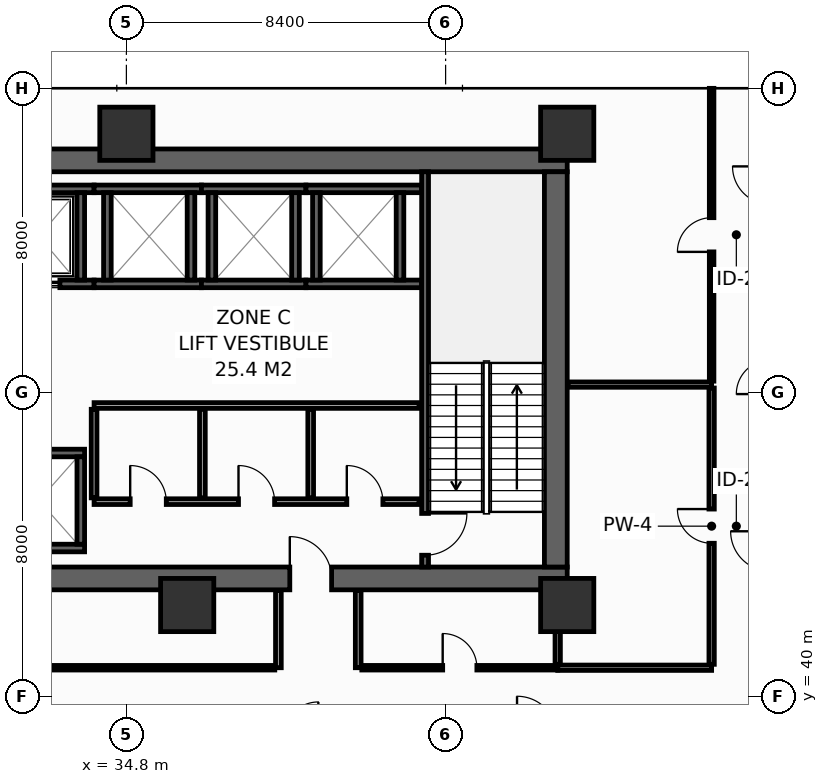
"""IFC4 building model, lengths in metres.
Left out: names, types, materials, properties, quantities, classifications, styles, units other than length and angle.
Written with IfcOpenShell. Run it as: python <this file> out.ifc"""

import sys

from ifc_helpers import new_model, si_unit, direction, frame, frame_2d, origin, origin_2d, place, context, subcontext, project, spatial, rectangle, hollow_rectangle, extrude, element, fill, save


model = new_model("IFC4")
c1 = context("Model", 3, precision=1e-05, world=origin(), true_north=direction((0.0, 1.0)))
c2 = subcontext(c1, "Body", "Model", "MODEL_VIEW")
j1 = project(units=[si_unit("LENGTHUNIT", "METRE"), si_unit("PLANEANGLEUNIT", "RADIAN")], contexts=[c1])
p1 = place(None, origin())
s1 = spatial("IfcSite", under=j1, at=p1, CompositionType="ELEMENT")
p2 = place(p1, origin())
s2 = spatial("IfcBuilding", under=s1, at=p2, CompositionType="ELEMENT")
p3 = place(p2, frame((0.0, 0.0, 33.0)))
s3 = spatial("IfcBuildingStorey", under=s2, at=p3, CompositionType="ELEMENT", Elevation=33.0)
p4 = place(p3, frame((13.5, 43.1, 0.0), z_axis=(0.0, 0.0, 1.0), x_axis=(1.0, 0.0, 0.0)))
e1 = element("IfcWall", 1, at=p4, inside=s3, PredefinedType="SHEAR", context=c2, shape_type="SweptSolid", body=[
    extrude(rectangle(XDim=32.9, YDim=0.6, at=frame_2d((16.45, 0.0))), origin(), (0.0, 0.0, 1.0), 4.95),
])
p5 = place(p4, frame((5.4, 0.0, 0.0)))
e2 = element("IfcOpeningElement", 2, at=p5, cuts=e1, PredefinedType="OPENING", context=c2, shape_type="SweptSolid", body=[
    extrude(rectangle(XDim=1.1, YDim=2.15, at=frame_2d((0.55, 1.075))), frame((0.0, 0.31, 0.0), z_axis=(0.0, -1.0, 0.0), x_axis=(1.0, 0.0, 0.0)), (0.0, 0.0, 1.0), 0.62),
])
p6 = place(p4, frame((25.6, 0.0, 0.0)))
e3 = element("IfcOpeningElement", 3, at=p6, cuts=e1, PredefinedType="OPENING", context=c2, shape_type="SweptSolid", body=[
    extrude(rectangle(XDim=1.1, YDim=2.15, at=frame_2d((0.55, 1.075))), frame((0.0, 0.31, 0.0), z_axis=(0.0, -1.0, 0.0), x_axis=(1.0, 0.0, 0.0)), (0.0, 0.0, 1.0), 0.62),
])
p7 = place(p3, frame((13.5, 54.1, 0.0), z_axis=(0.0, 0.0, 1.0), x_axis=(1.0, 0.0, 0.0)))
e4 = element("IfcWall", 4, at=p7, inside=s3, PredefinedType="SHEAR", context=c2, shape_type="SweptSolid", body=[
    extrude(rectangle(XDim=32.9, YDim=0.6, at=frame_2d((16.45, 0.0))), origin(), (0.0, 0.0, 1.0), 4.95),
])
p8 = place(p3, frame((46.1, 43.4, 0.0), z_axis=(0.0, 0.0, 1.0), x_axis=(0.0, 1.0, 0.0)))
e5 = element("IfcWall", 5, at=p8, inside=s3, PredefinedType="SHEAR", context=c2, shape_type="SweptSolid", body=[
    extrude(rectangle(XDim=10.4, YDim=0.6, at=frame_2d((5.2, 0.0))), origin(), (0.0, 0.0, 1.0), 4.95),
])
for number, where, z_axis, x_axis in (
    (6, (34.8, 54.8, 0.0), (0.0, 0.0, 1.0), (1.0, 0.0, 0.0)),
    (7, (46.4, 54.8, 0.0), (0.0, 0.0, 1.0), (1.0, 0.0, 0.0)),
    (8, (36.4, 42.4, 0.0), (0.0, 0.0, 1.0), (1.0, 0.0, 0.0)),
    (9, (46.4, 42.4, 0.0), (0.0, 0.0, 1.0), (1.0, 0.0, 0.0)),
):
    element("IfcColumn", number, at=place(p3, frame(where, z_axis=z_axis, x_axis=x_axis)), inside=s3, PredefinedType="COLUMN", context=c2, shape_type="SweptSolid", body=[
        extrude(hollow_rectangle(XDim=1.4, YDim=1.4, WallThickness=0.065, at=origin_2d()), origin(), (0.0, 0.0, 1.0), 5.4),
    ])
p9 = place(p3, frame((31.125, 50.85, 0.0), z_axis=(0.0, 0.0, 1.0), x_axis=(1.0, 0.0, 0.0)))
e10 = element("IfcWall", 10, at=p9, inside=s3, PredefinedType="SHEAR", context=c2, shape_type="SweptSolid", body=[
    extrude(rectangle(XDim=2.825, YDim=0.2, at=frame_2d((1.413, 0.0))), origin(), (0.0, 0.0, 1.0), 4.95),
])
p10 = place(p9, frame((0.825, 0.0, 0.0)))
e11 = element("IfcOpeningElement", 11, at=p10, cuts=e10, PredefinedType="OPENING", context=c2, shape_type="SweptSolid", body=[
    extrude(rectangle(XDim=1.1, YDim=2.2, at=frame_2d((0.55, 1.1))), frame((0.0, 0.11, 0.0), z_axis=(0.0, -1.0, 0.0), x_axis=(1.0, 0.0, 0.0)), (0.0, 0.0, 1.0), 0.22),
])
p11 = place(p3, frame((31.125, 53.35, 0.0), z_axis=(0.0, 0.0, 1.0), x_axis=(1.0, 0.0, 0.0)))
e12 = element("IfcWall", 12, at=p11, inside=s3, PredefinedType="SHEAR", context=c2, shape_type="SweptSolid", body=[
    extrude(rectangle(XDim=2.825, YDim=0.2, at=frame_2d((1.413, 0.0))), origin(), (0.0, 0.0, 1.0), 4.95),
])
p12 = place(p3, frame((33.6, 50.95, 0.0), z_axis=(0.0, 0.0, 1.0), x_axis=(0.0, 1.0, 0.0)))
e13 = element("IfcWall", 13, at=p12, inside=s3, PredefinedType="SHEAR", context=c2, shape_type="SweptSolid", body=[
    extrude(rectangle(XDim=2.3, YDim=0.2, at=frame_2d((1.15, 0.0))), origin(), (0.0, 0.0, 1.0), 4.95),
])
for number, where, z_axis, x_axis in (
    (14, (31.125, 43.9, 0.0), (0.0, 0.0, 1.0), (1.0, 0.0, 0.0)),
    (15, (31.125, 46.4, 0.0), (0.0, 0.0, 1.0), (1.0, 0.0, 0.0)),
):
    element("IfcWall", number, at=place(p3, frame(where, z_axis=z_axis, x_axis=x_axis)), inside=s3, PredefinedType="SHEAR", context=c2, shape_type="SweptSolid", body=[
        extrude(rectangle(XDim=2.575, YDim=0.2, at=frame_2d((1.288, 0.0))), origin(), (0.0, 0.0, 1.0), 4.95),
    ])
p13 = place(p3, frame((33.6, 44.0, 0.0), z_axis=(0.0, 0.0, 1.0), x_axis=(0.0, 1.0, 0.0)))
e16 = element("IfcWall", 16, at=p13, inside=s3, PredefinedType="SHEAR", context=c2, shape_type="SweptSolid", body=[
    extrude(rectangle(XDim=2.3, YDim=0.2, at=frame_2d((1.15, 0.0))), origin(), (0.0, 0.0, 1.0), 4.95),
])
for number, where, z_axis, x_axis in (
    (17, (33.95, 50.85, 0.0), (0.0, 0.0, 1.0), (1.0, 0.0, 0.0)),
    (18, (33.95, 53.35, 0.0), (0.0, 0.0, 1.0), (1.0, 0.0, 0.0)),
):
    element("IfcWall", number, at=place(p3, frame(where, z_axis=z_axis, x_axis=x_axis)), inside=s3, PredefinedType="SHEAR", context=c2, shape_type="SweptSolid", body=[
        extrude(rectangle(XDim=2.825, YDim=0.2, at=frame_2d((1.413, 0.0))), origin(), (0.0, 0.0, 1.0), 4.95),
    ])
for number, where, z_axis, x_axis in (
    (19, (34.3, 50.95, 0.0), (0.0, 0.0, 1.0), (0.0, 1.0, 0.0)),
    (20, (36.5, 50.95, 0.0), (0.0, 0.0, 1.0), (0.0, 1.0, 0.0)),
):
    element("IfcWall", number, at=place(p3, frame(where, z_axis=z_axis, x_axis=x_axis)), inside=s3, PredefinedType="SHEAR", context=c2, shape_type="SweptSolid", body=[
        extrude(rectangle(XDim=2.3, YDim=0.2, at=frame_2d((1.15, 0.0))), origin(), (0.0, 0.0, 1.0), 4.95),
    ])
for number, where, z_axis, x_axis in (
    (21, (36.775, 50.85, 0.0), (0.0, 0.0, 1.0), (1.0, 0.0, 0.0)),
    (22, (36.775, 53.35, 0.0), (0.0, 0.0, 1.0), (1.0, 0.0, 0.0)),
):
    element("IfcWall", number, at=place(p3, frame(where, z_axis=z_axis, x_axis=x_axis)), inside=s3, PredefinedType="SHEAR", context=c2, shape_type="SweptSolid", body=[
        extrude(rectangle(XDim=2.75, YDim=0.2, at=frame_2d((1.375, 0.0))), origin(), (0.0, 0.0, 1.0), 4.95),
    ])
for number, where, z_axis, x_axis in (
    (23, (37.05, 50.95, 0.0), (0.0, 0.0, 1.0), (0.0, 1.0, 0.0)),
    (24, (39.25, 50.95, 0.0), (0.0, 0.0, 1.0), (0.0, 1.0, 0.0)),
):
    element("IfcWall", number, at=place(p3, frame(where, z_axis=z_axis, x_axis=x_axis)), inside=s3, PredefinedType="SHEAR", context=c2, shape_type="SweptSolid", body=[
        extrude(rectangle(XDim=2.3, YDim=0.2, at=frame_2d((1.15, 0.0))), origin(), (0.0, 0.0, 1.0), 4.95),
    ])
for number, where, z_axis, x_axis in (
    (25, (39.525, 50.85, 0.0), (0.0, 0.0, 1.0), (1.0, 0.0, 0.0)),
    (26, (39.525, 53.35, 0.0), (0.0, 0.0, 1.0), (1.0, 0.0, 0.0)),
):
    element("IfcWall", number, at=place(p3, frame(where, z_axis=z_axis, x_axis=x_axis)), inside=s3, PredefinedType="SHEAR", context=c2, shape_type="SweptSolid", body=[
        extrude(rectangle(XDim=3.045, YDim=0.2, at=frame_2d((1.522, 0.0))), origin(), (0.0, 0.0, 1.0), 4.95),
    ])
for number, where, z_axis, x_axis in (
    (27, (39.8, 50.95, 0.0), (0.0, 0.0, 1.0), (0.0, 1.0, 0.0)),
    (28, (42.0, 50.95, 0.0), (0.0, 0.0, 1.0), (0.0, 1.0, 0.0)),
):
    element("IfcWall", number, at=place(p3, frame(where, z_axis=z_axis, x_axis=x_axis)), inside=s3, PredefinedType="SHEAR", context=c2, shape_type="SweptSolid", body=[
        extrude(rectangle(XDim=2.3, YDim=0.2, at=frame_2d((1.15, 0.0))), origin(), (0.0, 0.0, 1.0), 4.95),
    ])
p14 = place(p3, frame((42.66, 53.8, 0.0), z_axis=(0.0, 0.0, 1.0), x_axis=(0.0, -1.0, 0.0)))
e29 = element("IfcWall", 29, at=p14, inside=s3, PredefinedType="SHEAR", context=c2, shape_type="SweptSolid", body=[
    extrude(rectangle(XDim=10.4, YDim=0.18, at=frame_2d((5.2, 0.0))), origin(), (0.0, 0.0, 1.0), 4.95),
])
p15 = place(p14, frame((8.99, 0.0, 0.0)))
e30 = element("IfcOpeningElement", 30, at=p15, cuts=e29, PredefinedType="OPENING", context=c2, shape_type="SweptSolid", body=[
    extrude(rectangle(XDim=1.1, YDim=2.15, at=frame_2d((0.55, 1.075))), frame((0.0, 0.1, 0.0), z_axis=(0.0, -1.0, 0.0), x_axis=(1.0, 0.0, 0.0)), (0.0, 0.0, 1.0), 0.2),
])
p16 = place(p3, frame((33.95, 45.12, 0.0), z_axis=(0.0, 0.0, 1.0), x_axis=(1.0, 0.0, 0.0)))
e31 = element("IfcWall", 31, at=p16, inside=s3, PredefinedType="PARTITIONING", context=c2, shape_type="SweptSolid", body=[
    extrude(rectangle(XDim=8.55, YDim=0.15, at=frame_2d((4.275, 0.0))), origin(), (0.0, 0.0, 1.0), 4.95),
])
p17 = place(p16, frame((0.95, 0.0, 0.0)))
e32 = element("IfcOpeningElement", 32, at=p17, cuts=e31, PredefinedType="OPENING", context=c2, shape_type="SweptSolid", body=[
    extrude(rectangle(XDim=0.95, YDim=2.15, at=frame_2d((0.475, 1.075))), frame((0.0, 0.085, 0.0), z_axis=(0.0, -1.0, 0.0), x_axis=(1.0, 0.0, 0.0)), (0.0, 0.0, 1.0), 0.17),
])
p18 = place(p16, frame((3.8, 0.0, 0.0)))
e33 = element("IfcOpeningElement", 33, at=p18, cuts=e31, PredefinedType="OPENING", context=c2, shape_type="SweptSolid", body=[
    extrude(rectangle(XDim=0.95, YDim=2.15, at=frame_2d((0.475, 1.075))), frame((0.0, 0.085, 0.0), z_axis=(0.0, -1.0, 0.0), x_axis=(1.0, 0.0, 0.0)), (0.0, 0.0, 1.0), 0.17),
])
p19 = place(p16, frame((6.65, 0.0, 0.0)))
e34 = element("IfcOpeningElement", 34, at=p19, cuts=e31, PredefinedType="OPENING", context=c2, shape_type="SweptSolid", body=[
    extrude(rectangle(XDim=0.95, YDim=2.15, at=frame_2d((0.475, 1.075))), frame((0.0, 0.085, 0.0), z_axis=(0.0, -1.0, 0.0), x_axis=(1.0, 0.0, 0.0)), (0.0, 0.0, 1.0), 0.17),
])
p20 = place(p3, frame((33.95, 47.65, 0.0), z_axis=(0.0, 0.0, 1.0), x_axis=(1.0, 0.0, 0.0)))
e35 = element("IfcWall", 35, at=p20, inside=s3, PredefinedType="PARTITIONING", context=c2, shape_type="SweptSolid", body=[
    extrude(rectangle(XDim=8.55, YDim=0.15, at=frame_2d((4.275, 0.0))), origin(), (0.0, 0.0, 1.0), 4.95),
])
for number, where, z_axis, x_axis in (
    (36, (33.95, 45.22, 0.0), (0.0, 0.0, 1.0), (0.0, 1.0, 0.0)),
    (37, (36.8, 45.22, 0.0), (0.0, 0.0, 1.0), (0.0, 1.0, 0.0)),
    (38, (39.65, 45.22, 0.0), (0.0, 0.0, 1.0), (0.0, 1.0, 0.0)),
):
    element("IfcWall", number, at=place(p3, frame(where, z_axis=z_axis, x_axis=x_axis)), inside=s3, PredefinedType="PARTITIONING", context=c2, shape_type="SweptSolid", body=[
        extrude(rectangle(XDim=2.33, YDim=0.15, at=frame_2d((1.165, 0.0))), origin(), (0.0, 0.0, 1.0), 4.95),
    ])
p21 = place(p3, frame((46.15, 40.75, 0.0), z_axis=(0.0, 0.0, 1.0), x_axis=(1.0, 0.0, 0.0)))
e39 = element("IfcWall", 39, at=p21, inside=s3, PredefinedType="PARTITIONING", context=c2, shape_type="SweptSolid", body=[
    extrude(rectangle(XDim=4.05, YDim=0.14, at=frame_2d((2.025, 0.0))), origin(), (0.0, 0.0, 1.0), 4.95),
])
p22 = place(p3, frame((46.15, 40.84, 0.0), z_axis=(0.0, 0.0, 1.0), x_axis=(0.0, 1.0, 0.0)))
e40 = element("IfcWall", 40, at=p22, inside=s3, PredefinedType="PARTITIONING", context=c2, shape_type="SweptSolid", body=[
    extrude(rectangle(XDim=1.94, YDim=0.14, at=frame_2d((0.97, 0.0))), origin(), (0.0, 0.0, 1.0), 4.95),
])
p23 = place(p3, frame((46.42, 48.2, 0.0), z_axis=(0.0, 0.0, 1.0), x_axis=(1.0, 0.0, 0.0)))
e41 = element("IfcWall", 41, at=p23, inside=s3, PredefinedType="PARTITIONING", context=c2, shape_type="SweptSolid", body=[
    extrude(rectangle(XDim=3.78, YDim=0.14, at=frame_2d((1.89, 0.0))), origin(), (0.0, 0.0, 1.0), 4.95),
])
p24 = place(p3, frame((50.2, 40.84, 0.0), z_axis=(0.0, 0.0, 1.0), x_axis=(0.0, 1.0, 0.0)))
e42 = element("IfcWall", 42, at=p24, inside=s3, PredefinedType="PARTITIONING", context=c2, shape_type="SweptSolid", body=[
    extrude(rectangle(XDim=7.27, YDim=0.14, at=frame_2d((3.635, 0.0))), origin(), (0.0, 0.0, 1.0), 4.135),
])
p25 = place(p24, frame((3.185, 0.0, 0.0)))
e43 = element("IfcOpeningElement", 43, at=p25, cuts=e42, PredefinedType="OPENING", context=c2, shape_type="SweptSolid", body=[
    extrude(rectangle(XDim=0.9, YDim=2.1, at=frame_2d((0.45, 1.05))), frame((0.0, 0.08, 0.0), z_axis=(0.0, -1.0, 0.0), x_axis=(1.0, 0.0, 0.0)), (0.0, 0.0, 1.0), 0.16),
])
p26 = place(p3, frame((50.2, 48.29, 0.0), z_axis=(0.0, 0.0, 1.0), x_axis=(0.0, 1.0, 0.0)))
e44 = element("IfcWall", 44, at=p26, inside=s3, PredefinedType="PARTITIONING", context=c2, shape_type="SweptSolid", body=[
    extrude(rectangle(XDim=7.705, YDim=0.12, at=frame_2d((3.853, 0.0))), origin(), (0.0, 0.0, 1.0), 4.235),
])
p27 = place(p26, frame((3.402, 0.0, 0.0)))
e45 = element("IfcOpeningElement", 45, at=p27, cuts=e44, PredefinedType="OPENING", context=c2, shape_type="SweptSolid", body=[
    extrude(rectangle(XDim=0.9, YDim=2.1, at=frame_2d((0.45, 1.05))), frame((0.0, 0.07, 0.0), z_axis=(0.0, -1.0, 0.0), x_axis=(1.0, 0.0, 0.0)), (0.0, 0.0, 1.0), 0.14),
])
for number, where, z_axis, x_axis in (
    (46, (38.8, 40.75, 0.0), (0.0, 0.0, 1.0), (0.0, 1.0, 0.0)),
    (47, (40.9, 40.75, 0.0), (0.0, 0.0, 1.0), (0.0, 1.0, 0.0)),
):
    element("IfcWall", number, at=place(p3, frame(where, z_axis=z_axis, x_axis=x_axis)), inside=s3, PredefinedType="PARTITIONING", context=c2, shape_type="SweptSolid", body=[
        extrude(rectangle(XDim=2.03, YDim=0.15, at=frame_2d((1.015, 0.0))), origin(), (0.0, 0.0, 1.0), 4.95),
    ])
p28 = place(p3, frame((20.795, 40.75, 0.0), z_axis=(0.0, 0.0, 1.0), x_axis=(1.0, 0.0, 0.0)))
e48 = element("IfcWall", 48, at=p28, inside=s3, PredefinedType="PARTITIONING", context=c2, shape_type="SweptSolid", body=[
    extrude(rectangle(XDim=17.91, YDim=0.12, at=frame_2d((8.955, 0.0))), origin(), (0.0, 0.0, 1.0), 3.535),
])
p29 = place(p28, frame((8.505, 0.0, 0.0)))
e49 = element("IfcOpeningElement", 49, at=p29, cuts=e48, PredefinedType="OPENING", context=c2, shape_type="SweptSolid", body=[
    extrude(rectangle(XDim=0.9, YDim=2.1, at=frame_2d((0.45, 1.05))), frame((0.0, 0.07, 0.0), z_axis=(0.0, -1.0, 0.0), x_axis=(1.0, 0.0, 0.0)), (0.0, 0.0, 1.0), 0.14),
])
p30 = place(p3, frame((40.995, 40.75, 0.0), z_axis=(0.0, 0.0, 1.0), x_axis=(1.0, 0.0, 0.0)))
e50 = element("IfcWall", 50, at=p30, inside=s3, PredefinedType="PARTITIONING", context=c2, shape_type="SweptSolid", body=[
    extrude(rectangle(XDim=5.155, YDim=0.12, at=frame_2d((2.577, 0.0))), origin(), (0.0, 0.0, 1.0), 4.95),
])
p31 = place(p30, frame((2.128, 0.0, 0.0)))
e51 = element("IfcOpeningElement", 51, at=p31, cuts=e50, PredefinedType="OPENING", context=c2, shape_type="SweptSolid", body=[
    extrude(rectangle(XDim=0.9, YDim=2.1, at=frame_2d((0.45, 1.05))), frame((0.0, 0.07, 0.0), z_axis=(0.0, -1.0, 0.0), x_axis=(1.0, 0.0, 0.0)), (0.0, 0.0, 1.0), 0.14),
])
p32 = place(p10, origin())
e52 = element("IfcDoor", 52, at=p32, inside=s3, OperationType="SLIDING_TO_LEFT", PredefinedType="DOOR", context=c2, shape_type="SweptSolid", body=[
    extrude(rectangle(XDim=1.1, YDim=2.2, at=frame_2d((0.55, 1.1))), frame((0.0, 0.025, 0.0), z_axis=(0.0, -1.0, 0.0), x_axis=(1.0, 0.0, 0.0)), (0.0, 0.0, 1.0), 0.05),
])
fill(e11, e52)
p33 = place(p15, origin())
e53 = element("IfcDoor", 53, at=p33, inside=s3, OperationType="SINGLE_SWING_LEFT", PredefinedType="DOOR", context=c2, shape_type="SweptSolid", body=[
    extrude(rectangle(XDim=1.1, YDim=2.15, at=frame_2d((0.55, 1.075))), frame((0.0, 0.025, 0.0), z_axis=(0.0, -1.0, 0.0), x_axis=(1.0, 0.0, 0.0)), (0.0, 0.0, 1.0), 0.05),
])
fill(e30, e53)
p34 = place(p6, origin())
e54 = element("IfcDoor", 54, at=p34, inside=s3, OperationType="SINGLE_SWING_LEFT", PredefinedType="DOOR", context=c2, shape_type="SweptSolid", body=[
    extrude(rectangle(XDim=1.1, YDim=2.15, at=frame_2d((0.55, 1.075))), frame((0.0, 0.025, 0.0), z_axis=(0.0, -1.0, 0.0), x_axis=(1.0, 0.0, 0.0)), (0.0, 0.0, 1.0), 0.05),
])
fill(e3, e54)
p35 = place(p17, origin())
e55 = element("IfcDoor", 55, at=p35, inside=s3, OperationType="SINGLE_SWING_LEFT", PredefinedType="DOOR", context=c2, shape_type="SweptSolid", body=[
    extrude(rectangle(XDim=0.95, YDim=2.15, at=frame_2d((0.475, 1.075))), frame((0.0, 0.025, 0.0), z_axis=(0.0, -1.0, 0.0), x_axis=(1.0, 0.0, 0.0)), (0.0, 0.0, 1.0), 0.05),
])
fill(e32, e55)
p36 = place(p18, origin())
e56 = element("IfcDoor", 56, at=p36, inside=s3, OperationType="SINGLE_SWING_LEFT", PredefinedType="DOOR", context=c2, shape_type="SweptSolid", body=[
    extrude(rectangle(XDim=0.95, YDim=2.15, at=frame_2d((0.475, 1.075))), frame((0.0, 0.025, 0.0), z_axis=(0.0, -1.0, 0.0), x_axis=(1.0, 0.0, 0.0)), (0.0, 0.0, 1.0), 0.05),
])
fill(e33, e56)
p37 = place(p19, origin())
e57 = element("IfcDoor", 57, at=p37, inside=s3, OperationType="SINGLE_SWING_LEFT", PredefinedType="DOOR", context=c2, shape_type="SweptSolid", body=[
    extrude(rectangle(XDim=0.95, YDim=2.15, at=frame_2d((0.475, 1.075))), frame((0.0, 0.025, 0.0), z_axis=(0.0, -1.0, 0.0), x_axis=(1.0, 0.0, 0.0)), (0.0, 0.0, 1.0), 0.05),
])
fill(e34, e57)
p38 = place(p25, origin())
e58 = element("IfcDoor", 58, at=p38, inside=s3, OperationType="SINGLE_SWING_RIGHT", PredefinedType="DOOR", context=c2, shape_type="SweptSolid", body=[
    extrude(rectangle(XDim=0.9, YDim=2.1, at=frame_2d((0.45, 1.05))), frame((0.0, 0.025, 0.0), z_axis=(0.0, -1.0, 0.0), x_axis=(1.0, 0.0, 0.0)), (0.0, 0.0, 1.0), 0.05),
])
fill(e43, e58)
p39 = place(p27, origin())
e59 = element("IfcDoor", 59, at=p39, inside=s3, OperationType="SINGLE_SWING_LEFT", PredefinedType="DOOR", context=c2, shape_type="SweptSolid", body=[
    extrude(rectangle(XDim=0.9, YDim=2.1, at=frame_2d((0.45, 1.05))), frame((0.0, 0.025, 0.0), z_axis=(0.0, -1.0, 0.0), x_axis=(1.0, 0.0, 0.0)), (0.0, 0.0, 1.0), 0.05),
])
fill(e45, e59)
p40 = place(p31, origin())
e60 = element("IfcDoor", 60, at=p40, inside=s3, OperationType="SINGLE_SWING_LEFT", PredefinedType="DOOR", context=c2, shape_type="SweptSolid", body=[
    extrude(rectangle(XDim=0.9, YDim=2.1, at=frame_2d((0.45, 1.05))), frame((0.0, 0.025, 0.0), z_axis=(0.0, -1.0, 0.0), x_axis=(1.0, 0.0, 0.0)), (0.0, 0.0, 1.0), 0.05),
])
fill(e51, e60)
save(model, sys.argv[1])
